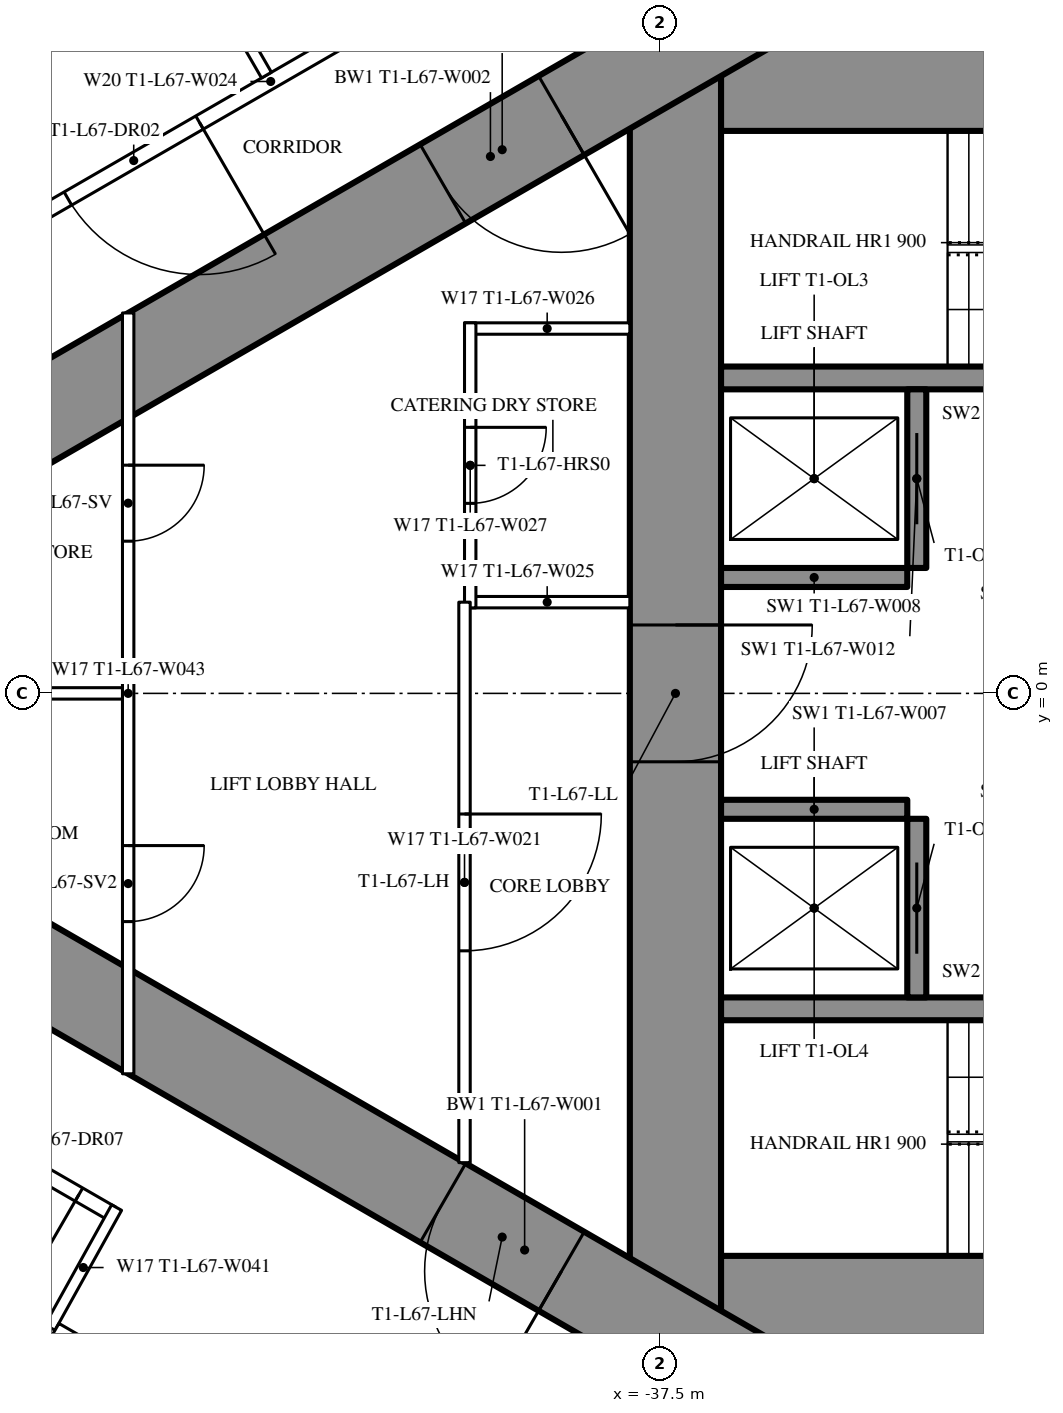
"""IFC4 building model, lengths in metres.
Left out: names, types, materials, properties, quantities, classifications, styles, units other than length and angle.
Written with IfcOpenShell. Run it as: python <this file> out.ifc"""

import sys

from ifc_helpers import new_model, si_unit, direction, frame, frame_2d, origin, place, context, subcontext, project, spatial, rectangle, extrude, element, fill, save


model = new_model("IFC4")
c1 = context("Model", 3, precision=1e-05, world=origin(), true_north=direction((0.0, 1.0)))
c2 = subcontext(c1, "Body", "Model", "MODEL_VIEW")
j1 = project(units=[si_unit("LENGTHUNIT", "METRE"), si_unit("PLANEANGLEUNIT", "RADIAN")], contexts=[c1])
p1 = place(None, origin())
s1 = spatial("IfcSite", under=j1, at=p1, CompositionType="ELEMENT")
p2 = place(p1, origin())
s2 = spatial("IfcBuilding", under=s1, at=p2, CompositionType="ELEMENT")
p3 = place(p2, frame((0.0, 0.0, 251.9)))
s3 = spatial("IfcBuildingStorey", under=s2, at=p3, CompositionType="ELEMENT", Elevation=251.9)
p4 = place(p3, frame((-37.3, 8.6, 0.0), z_axis=(0.0, 0.0, 1.0), x_axis=(0.0, -1.0, 0.0)))
e1 = element("IfcWall", 1, at=p4, inside=s3, PredefinedType="SHEAR", context=c2, shape_type="SweptSolid", body=[
    extrude(rectangle(XDim=17.2, YDim=1.2, at=frame_2d((8.6, 0.0))), origin(), (0.0, 0.0, 1.0), 5.4),
])
p5 = place(p4, frame((7.7, 0.0, 0.0)))
e2 = element("IfcOpeningElement", 2, at=p5, cuts=e1, PredefinedType="OPENING", context=c2, shape_type="SweptSolid", body=[
    extrude(rectangle(XDim=1.8, YDim=2.2, at=frame_2d((0.9, 1.1))), frame((0.0, 0.61, 0.0), z_axis=(0.0, -1.0, 0.0), x_axis=(1.0, 0.0, 0.0)), (0.0, 0.0, 1.0), 1.22),
])
p6 = place(p3, frame((-28.3, 8.0, 0.0), z_axis=(0.0, 0.0, 1.0), x_axis=(-1.0, 0.0, 0.0)))
e3 = element("IfcWall", 3, at=p6, inside=s3, PredefinedType="SHEAR", context=c2, shape_type="SweptSolid", body=[
    extrude(rectangle(XDim=8.4, YDim=1.2, at=frame_2d((4.2, 0.0))), origin(), (0.0, 0.0, 1.0), 5.4),
])
p7 = place(p6, frame((0.25, 0.0, 0.0)))
e4 = element("IfcOpeningElement", 4, at=p7, cuts=e3, PredefinedType="OPENING", context=c2, shape_type="SweptSolid", body=[
    extrude(rectangle(XDim=1.0, YDim=2.2, at=frame_2d((0.5, 1.1))), frame((0.0, 0.61, 0.0), z_axis=(0.0, -1.0, 0.0), x_axis=(1.0, 0.0, 0.0)), (0.0, 0.0, 1.0), 1.22),
])
p8 = place(p3, frame((-28.3, -8.0, 0.0), z_axis=(0.0, 0.0, 1.0), x_axis=(-1.0, 0.0, 0.0)))
e5 = element("IfcWall", 5, at=p8, inside=s3, PredefinedType="SHEAR", context=c2, shape_type="SweptSolid", body=[
    extrude(rectangle(XDim=8.4, YDim=1.2, at=frame_2d((4.2, 0.0))), origin(), (0.0, 0.0, 1.0), 5.4),
])
p9 = place(p8, frame((0.25, 0.0, 0.0)))
e6 = element("IfcOpeningElement", 6, at=p9, cuts=e5, PredefinedType="OPENING", context=c2, shape_type="SweptSolid", body=[
    extrude(rectangle(XDim=1.0, YDim=2.2, at=frame_2d((0.5, 1.1))), frame((0.0, 0.61, 0.0), z_axis=(0.0, -1.0, 0.0), x_axis=(1.0, 0.0, 0.0)), (0.0, 0.0, 1.0), 1.22),
])
for number, where, z_axis, x_axis in (
    (7, (-28.3, 4.15, 0.0), (0.0, 0.0, 1.0), (-1.0, 0.0, 0.0)),
    (8, (-28.3, -4.15, 0.0), (0.0, 0.0, 1.0), (-1.0, 0.0, 0.0)),
):
    element("IfcWall", number, at=place(p3, frame(where, z_axis=z_axis, x_axis=x_axis)), inside=s3, PredefinedType="SHEAR", context=c2, shape_type="SweptSolid", body=[
        extrude(rectangle(XDim=8.4, YDim=0.3, at=frame_2d((4.2, 0.0))), origin(), (0.0, 0.0, 1.0), 5.4),
    ])
p10 = place(p3, frame((-34.125, 4.0, 0.0), z_axis=(0.0, 0.0, 1.0), x_axis=(0.0, -1.0, 0.0)))
e9 = element("IfcWall", 9, at=p10, inside=s3, PredefinedType="SHEAR", context=c2, shape_type="SweptSolid", body=[
    extrude(rectangle(XDim=2.35, YDim=0.25, at=frame_2d((1.175, 0.0))), origin(), (0.0, 0.0, 1.0), 5.4),
])
p11 = place(p10, frame((0.575, 0.0, 0.0)))
e10 = element("IfcOpeningElement", 10, at=p11, cuts=e9, PredefinedType="OPENING", context=c2, shape_type="SweptSolid", body=[
    extrude(rectangle(XDim=1.2, YDim=2.2, at=frame_2d((0.6, 1.1))), frame((0.0, 0.135, 0.0), z_axis=(0.0, -1.0, 0.0), x_axis=(1.0, 0.0, 0.0)), (0.0, 0.0, 1.0), 0.27),
])
p12 = place(p3, frame((-34.25, 1.525, 0.0), z_axis=(0.0, 0.0, 1.0), x_axis=(-1.0, 0.0, 0.0)))
e11 = element("IfcWall", 11, at=p12, inside=s3, PredefinedType="SHEAR", context=c2, shape_type="SweptSolid", body=[
    extrude(rectangle(XDim=2.45, YDim=0.25, at=frame_2d((1.225, 0.0))), origin(), (0.0, 0.0, 1.0), 5.4),
])
p13 = place(p3, frame((-34.125, -1.65, 0.0), z_axis=(0.0, 0.0, 1.0), x_axis=(0.0, -1.0, 0.0)))
e12 = element("IfcWall", 12, at=p13, inside=s3, PredefinedType="SHEAR", context=c2, shape_type="SweptSolid", body=[
    extrude(rectangle(XDim=2.35, YDim=0.25, at=frame_2d((1.175, 0.0))), origin(), (0.0, 0.0, 1.0), 5.4),
])
p14 = place(p13, frame((0.575, 0.0, 0.0)))
e13 = element("IfcOpeningElement", 13, at=p14, cuts=e12, PredefinedType="OPENING", context=c2, shape_type="SweptSolid", body=[
    extrude(rectangle(XDim=1.2, YDim=2.2, at=frame_2d((0.6, 1.1))), frame((0.0, 0.135, 0.0), z_axis=(0.0, -1.0, 0.0), x_axis=(1.0, 0.0, 0.0)), (0.0, 0.0, 1.0), 0.27),
])
p15 = place(p3, frame((-34.25, -1.525, 0.0), z_axis=(0.0, 0.0, 1.0), x_axis=(-1.0, 0.0, 0.0)))
e14 = element("IfcWall", 14, at=p15, inside=s3, PredefinedType="SHEAR", context=c2, shape_type="SweptSolid", body=[
    extrude(rectangle(XDim=2.45, YDim=0.25, at=frame_2d((1.225, 0.0))), origin(), (0.0, 0.0, 1.0), 5.4),
])
p16 = place(p3, frame((-27.2, 14.3, 0.0), z_axis=(0.0, 0.0, 1.0), x_axis=(-0.866026593062, -0.499997940104, 0.0)))
e15 = element("IfcWall", 15, at=p16, inside=s3, PredefinedType="SHEAR", context=c2, shape_type="SweptSolid", body=[
    extrude(rectangle(XDim=28.946, YDim=1.2, at=frame_2d((14.473, 0.0))), origin(), (0.0, 0.0, 1.0), 5.4),
])
p17 = place(p16, frame((4.6, 0.0, 0.0)))
e16 = element("IfcOpeningElement", 16, at=p17, cuts=e15, PredefinedType="OPENING", context=c2, shape_type="SweptSolid", body=[
    extrude(rectangle(XDim=1.0, YDim=2.2, at=frame_2d((0.5, 1.1))), frame((0.0, 0.61, 0.0), z_axis=(0.0, -1.0, 0.0), x_axis=(1.0, 0.0, 0.0)), (0.0, 0.0, 1.0), 1.22),
])
p18 = place(p16, frame((13.395, 0.0, 0.0)))
e17 = element("IfcOpeningElement", 17, at=p18, cuts=e15, PredefinedType="OPENING", context=c2, shape_type="SweptSolid", body=[
    extrude(rectangle(XDim=1.8, YDim=2.2, at=frame_2d((0.9, 1.1))), frame((0.0, 0.61, 0.0), z_axis=(0.0, -1.0, 0.0), x_axis=(1.0, 0.0, 0.0)), (0.0, 0.0, 1.0), 1.22),
])
p19 = place(p3, frame((-27.2, -14.3, 0.0), z_axis=(0.0, 0.0, 1.0), x_axis=(-0.866024021859, 0.500002393557, 0.0)))
e18 = element("IfcWall", 18, at=p19, inside=s3, PredefinedType="SHEAR", context=c2, shape_type="SweptSolid", body=[
    extrude(rectangle(XDim=27.907, YDim=1.2, at=frame_2d((13.954, 0.0))), origin(), (0.0, 0.0, 1.0), 5.4),
])
p20 = place(p19, frame((4.6, 0.0, 0.0)))
e19 = element("IfcOpeningElement", 19, at=p20, cuts=e18, PredefinedType="OPENING", context=c2, shape_type="SweptSolid", body=[
    extrude(rectangle(XDim=1.0, YDim=2.2, at=frame_2d((0.5, 1.1))), frame((0.0, 0.61, 0.0), z_axis=(0.0, -1.0, 0.0), x_axis=(1.0, 0.0, 0.0)), (0.0, 0.0, 1.0), 1.22),
])
p21 = place(p19, frame((13.395, 0.0, 0.0)))
e20 = element("IfcOpeningElement", 20, at=p21, cuts=e18, PredefinedType="OPENING", context=c2, shape_type="SweptSolid", body=[
    extrude(rectangle(XDim=1.8, YDim=2.2, at=frame_2d((0.9, 1.1))), frame((0.0, 0.61, 0.0), z_axis=(0.0, -1.0, 0.0), x_axis=(1.0, 0.0, 0.0)), (0.0, 0.0, 1.0), 1.22),
])
p22 = place(p3, frame((-28.681, 16.101, 0.0), z_axis=(0.0, 0.0, 1.0), x_axis=(-0.866024860443, -0.500000941094, 0.0)))
e21 = element("IfcWall", 21, at=p22, inside=s3, PredefinedType="PARTITIONING", context=c2, shape_type="SweptSolid", body=[
    extrude(rectangle(XDim=32.201, YDim=0.2, at=frame_2d((16.101, 0.0))), origin(), (0.0, 0.0, 1.0), 5.15),
])
p23 = place(p22, frame((7.266, 0.0, 0.0)))
e22 = element("IfcOpeningElement", 22, at=p23, cuts=e21, PredefinedType="OPENING", context=c2, shape_type="SweptSolid", body=[
    extrude(rectangle(XDim=1.8, YDim=2.2, at=frame_2d((0.9, 1.1))), frame((0.0, 0.11, 0.0), z_axis=(0.0, -1.0, 0.0), x_axis=(1.0, 0.0, 0.0)), (0.0, 0.0, 1.0), 0.22),
])
p24 = place(p22, frame((17.182, 0.0, 0.0)))
e23 = element("IfcOpeningElement", 23, at=p24, cuts=e21, PredefinedType="OPENING", context=c2, shape_type="SweptSolid", body=[
    extrude(rectangle(XDim=2.0, YDim=2.4, at=frame_2d((1.0, 1.2))), frame((0.0, 0.11, 0.0), z_axis=(0.0, -1.0, 0.0), x_axis=(1.0, 0.0, 0.0)), (0.0, 0.0, 1.0), 0.22),
])
p25 = place(p22, frame((21.43, 0.0, 0.0)))
e24 = element("IfcOpeningElement", 24, at=p25, cuts=e21, PredefinedType="OPENING", context=c2, shape_type="SweptSolid", body=[
    extrude(rectangle(XDim=1.8, YDim=2.2, at=frame_2d((0.9, 1.1))), frame((0.0, 0.11, 0.0), z_axis=(0.0, -1.0, 0.0), x_axis=(1.0, 0.0, 0.0)), (0.0, 0.0, 1.0), 0.22),
])
p26 = place(p22, frame((27.29, 0.0, 0.0)))
e25 = element("IfcOpeningElement", 25, at=p26, cuts=e21, PredefinedType="OPENING", context=c2, shape_type="SweptSolid", body=[
    extrude(rectangle(XDim=1.8, YDim=2.2, at=frame_2d((0.9, 1.1))), frame((0.0, 0.11, 0.0), z_axis=(0.0, -1.0, 0.0), x_axis=(1.0, 0.0, 0.0)), (0.0, 0.0, 1.0), 0.22),
])
p27 = place(p3, frame((-42.68, 8.134, 0.0), z_axis=(0.0, 0.0, 1.0), x_axis=(-0.499984479505, 0.866034364361, 0.0)))
e26 = element("IfcWall", 26, at=p27, inside=s3, PredefinedType="PARTITIONING", context=c2, shape_type="SweptSolid", body=[
    extrude(rectangle(XDim=5.995, YDim=0.15, at=frame_2d((2.998, 0.0))), origin(), (0.0, 0.0, 1.0), 4.25),
])
p28 = place(p3, frame((-44.715, -6.844, 0.0), z_axis=(0.0, 0.0, 1.0), x_axis=(-0.866025261224, 0.500000246922, 0.0)))
e27 = element("IfcWall", 27, at=p28, inside=s3, PredefinedType="PARTITIONING", context=c2, shape_type="SweptSolid", body=[
    extrude(rectangle(XDim=13.567, YDim=0.2, at=frame_2d((6.783, 0.0))), origin(), (0.0, 0.0, 1.0), 5.15),
])
p29 = place(p28, frame((8.616, 0.0, 0.0)))
e28 = element("IfcOpeningElement", 28, at=p29, cuts=e27, PredefinedType="OPENING", context=c2, shape_type="SweptSolid", body=[
    extrude(rectangle(XDim=2.0, YDim=2.4, at=frame_2d((1.0, 1.2))), frame((0.0, 0.11, 0.0), z_axis=(0.0, -1.0, 0.0), x_axis=(1.0, 0.0, 0.0)), (0.0, 0.0, 1.0), 0.22),
])
p30 = place(p28, frame((2.816, 0.0, 0.0)))
e29 = element("IfcOpeningElement", 29, at=p30, cuts=e27, PredefinedType="OPENING", context=c2, shape_type="SweptSolid", body=[
    extrude(rectangle(XDim=2.0, YDim=2.4, at=frame_2d((1.0, 1.2))), frame((0.0, 0.11, 0.0), z_axis=(0.0, -1.0, 0.0), x_axis=(1.0, 0.0, 0.0)), (0.0, 0.0, 1.0), 0.22),
])
p31 = place(p28, frame((0.5, 0.0, 0.0)))
e30 = element("IfcOpeningElement", 30, at=p31, cuts=e27, PredefinedType="OPENING", context=c2, shape_type="SweptSolid", body=[
    extrude(rectangle(XDim=0.967, YDim=2.2, at=frame_2d((0.483, 1.1))), frame((0.0, 0.11, 0.0), z_axis=(0.0, -1.0, 0.0), x_axis=(1.0, 0.0, 0.0)), (0.0, 0.0, 1.0), 0.22),
])
p32 = place(p3, frame((-44.652, -6.764, 0.0), z_axis=(0.0, 0.0, 1.0), x_axis=(-0.485528096672, -0.8742210632, 0.0)))
e31 = element("IfcWall", 31, at=p32, inside=s3, PredefinedType="PARTITIONING", context=c2, shape_type="SweptSolid", body=[
    extrude(rectangle(XDim=1.805, YDim=0.15, at=frame_2d((0.903, 0.0))), origin(), (0.0, 0.0, 1.0), 5.15),
])
for number, where, z_axis, x_axis in (
    (32, (-37.9, 1.2, 0.0), (0.0, 0.0, 1.0), (-1.0, 0.0, 0.0)),
    (33, (-37.9, 4.8, 0.0), (0.0, 0.0, 1.0), (-1.0, 0.0, 0.0)),
):
    element("IfcWall", number, at=place(p3, frame(where, z_axis=z_axis, x_axis=x_axis)), inside=s3, PredefinedType="PARTITIONING", context=c2, shape_type="SweptSolid", body=[
        extrude(rectangle(XDim=2.175, YDim=0.15, at=frame_2d((1.087, 0.0))), origin(), (0.0, 0.0, 1.0), 5.15),
    ])
p33 = place(p3, frame((-40.0, 4.875, 0.0), z_axis=(0.0, 0.0, 1.0), x_axis=(0.0, -1.0, 0.0)))
e34 = element("IfcWall", 34, at=p33, inside=s3, PredefinedType="PARTITIONING", context=c2, shape_type="SweptSolid", body=[
    extrude(rectangle(XDim=3.75, YDim=0.15, at=frame_2d((1.875, 0.0))), origin(), (0.0, 0.0, 1.0), 5.15),
])
p34 = place(p33, frame((1.375, 0.0, 0.0)))
e35 = element("IfcOpeningElement", 35, at=p34, cuts=e34, PredefinedType="OPENING", context=c2, shape_type="SweptSolid", body=[
    extrude(rectangle(XDim=1.0, YDim=2.2, at=frame_2d((0.5, 1.1))), frame((0.0, 0.085, 0.0), z_axis=(0.0, -1.0, 0.0), x_axis=(1.0, 0.0, 0.0)), (0.0, 0.0, 1.0), 0.17),
])
p35 = place(p3, frame((-40.075, 1.2, 0.0), z_axis=(0.0, 0.0, 1.0), x_axis=(0.0, -1.0, 0.0)))
e36 = element("IfcWall", 36, at=p35, inside=s3, PredefinedType="PARTITIONING", context=c2, shape_type="SweptSolid", body=[
    extrude(rectangle(XDim=7.374, YDim=0.15, at=frame_2d((3.687, 0.0))), origin(), (0.0, 0.0, 1.0), 5.15),
])
p36 = place(p35, frame((2.787, 0.0, 0.0)))
e37 = element("IfcOpeningElement", 37, at=p36, cuts=e36, PredefinedType="OPENING", context=c2, shape_type="SweptSolid", body=[
    extrude(rectangle(XDim=1.8, YDim=2.2, at=frame_2d((0.9, 1.1))), frame((0.0, 0.085, 0.0), z_axis=(0.0, -1.0, 0.0), x_axis=(1.0, 0.0, 0.0)), (0.0, 0.0, 1.0), 0.17),
])
p37 = place(p3, frame((-44.5, 5.005, 0.0), z_axis=(0.0, 0.0, 1.0), x_axis=(0.0, -1.0, 0.0)))
e38 = element("IfcWall", 38, at=p37, inside=s3, PredefinedType="PARTITIONING", context=c2, shape_type="SweptSolid", body=[
    extrude(rectangle(XDim=10.009, YDim=0.15, at=frame_2d((5.005, 0.0))), origin(), (0.0, 0.0, 1.0), 4.3),
])
p38 = place(p37, frame((2.002, 0.0, 0.0)))
e39 = element("IfcOpeningElement", 39, at=p38, cuts=e38, PredefinedType="OPENING", context=c2, shape_type="SweptSolid", body=[
    extrude(rectangle(XDim=1.0, YDim=2.2, at=frame_2d((0.5, 1.1))), frame((0.0, 0.085, 0.0), z_axis=(0.0, -1.0, 0.0), x_axis=(1.0, 0.0, 0.0)), (0.0, 0.0, 1.0), 0.17),
])
p39 = place(p37, frame((7.007, 0.0, 0.0)))
e40 = element("IfcOpeningElement", 40, at=p39, cuts=e38, PredefinedType="OPENING", context=c2, shape_type="SweptSolid", body=[
    extrude(rectangle(XDim=1.0, YDim=2.2, at=frame_2d((0.5, 1.1))), frame((0.0, 0.085, 0.0), z_axis=(0.0, -1.0, 0.0), x_axis=(1.0, 0.0, 0.0)), (0.0, 0.0, 1.0), 0.17),
])
p40 = place(p3, frame((-44.575, 0.0, 0.0), z_axis=(0.0, 0.0, 1.0), x_axis=(-1.0, 0.0, 0.0)))
e41 = element("IfcWall", 41, at=p40, inside=s3, PredefinedType="PARTITIONING", context=c2, shape_type="SweptSolid", body=[
    extrude(rectangle(XDim=8.593, YDim=0.15, at=frame_2d((4.297, 0.0))), origin(), (0.0, 0.0, 1.0), 4.25),
])
p41 = place(p3, frame((-39.758, -11.697, 0.0), z_axis=(0.0, 0.0, 1.0), x_axis=(-0.866024194504, 0.500002094529, 0.0)))
e42 = element("IfcWall", 42, at=p41, inside=s3, PredefinedType="PARTITIONING", context=c2, shape_type="SweptSolid", body=[
    extrude(rectangle(XDim=6.6, YDim=0.25, at=frame_2d((3.3, 0.0))), origin(), (0.0, 0.0, 1.0), 5.15),
])
p42 = place(p24, origin())
e43 = element("IfcDoor", 43, at=p42, inside=s3, OperationType="DOUBLE_DOOR_SINGLE_SWING", PredefinedType="DOOR", context=c2, shape_type="SweptSolid", body=[
    extrude(rectangle(XDim=2.0, YDim=2.4, at=frame_2d((1.0, 1.2))), frame((0.0, 0.025, 0.0), z_axis=(0.0, -1.0, 0.0), x_axis=(1.0, 0.0, 0.0)), (0.0, 0.0, 1.0), 0.05),
])
fill(e23, e43)
p43 = place(p31, origin())
e44 = element("IfcDoor", 44, at=p43, inside=s3, OperationType="SINGLE_SWING_LEFT", PredefinedType="DOOR", context=c2, shape_type="SweptSolid", body=[
    extrude(rectangle(XDim=0.967, YDim=2.2, at=frame_2d((0.483, 1.1))), frame((0.0, 0.025, 0.0), z_axis=(0.0, -1.0, 0.0), x_axis=(1.0, 0.0, 0.0)), (0.0, 0.0, 1.0), 0.05),
])
fill(e30, e44)
p44 = place(p34, origin())
e45 = element("IfcDoor", 45, at=p44, inside=s3, OperationType="SINGLE_SWING_LEFT", PredefinedType="DOOR", context=c2, shape_type="SweptSolid", body=[
    extrude(rectangle(XDim=1.0, YDim=2.2, at=frame_2d((0.5, 1.1))), frame((0.0, 0.025, 0.0), z_axis=(0.0, -1.0, 0.0), x_axis=(1.0, 0.0, 0.0)), (0.0, 0.0, 1.0), 0.05),
])
fill(e35, e45)
p45 = place(p36, origin())
e46 = element("IfcDoor", 46, at=p45, inside=s3, OperationType="DOUBLE_DOOR_SINGLE_SWING", PredefinedType="DOOR", context=c2, shape_type="SweptSolid", body=[
    extrude(rectangle(XDim=1.8, YDim=2.2, at=frame_2d((0.9, 1.1))), frame((0.0, 0.025, 0.0), z_axis=(0.0, -1.0, 0.0), x_axis=(1.0, 0.0, 0.0)), (0.0, 0.0, 1.0), 0.05),
])
fill(e37, e46)
p46 = place(p38, origin())
e47 = element("IfcDoor", 47, at=p46, inside=s3, OperationType="SINGLE_SWING_LEFT", PredefinedType="DOOR", context=c2, shape_type="SweptSolid", body=[
    extrude(rectangle(XDim=1.0, YDim=2.2, at=frame_2d((0.5, 1.1))), frame((0.0, 0.025, 0.0), z_axis=(0.0, -1.0, 0.0), x_axis=(1.0, 0.0, 0.0)), (0.0, 0.0, 1.0), 0.05),
])
fill(e39, e47)
p47 = place(p39, origin())
e48 = element("IfcDoor", 48, at=p47, inside=s3, OperationType="SINGLE_SWING_LEFT", PredefinedType="DOOR", context=c2, shape_type="SweptSolid", body=[
    extrude(rectangle(XDim=1.0, YDim=2.2, at=frame_2d((0.5, 1.1))), frame((0.0, 0.025, 0.0), z_axis=(0.0, -1.0, 0.0), x_axis=(1.0, 0.0, 0.0)), (0.0, 0.0, 1.0), 0.05),
])
fill(e40, e48)
p48 = place(p18, origin())
e49 = element("IfcDoor", 49, at=p48, inside=s3, OperationType="DOUBLE_DOOR_SINGLE_SWING", PredefinedType="DOOR", context=c2, shape_type="SweptSolid", body=[
    extrude(rectangle(XDim=1.8, YDim=2.2, at=frame_2d((0.9, 1.1))), frame((0.0, 0.025, 0.0), z_axis=(0.0, -1.0, 0.0), x_axis=(1.0, 0.0, 0.0)), (0.0, 0.0, 1.0), 0.05),
])
fill(e17, e49)
p49 = place(p21, origin())
e50 = element("IfcDoor", 50, at=p49, inside=s3, OperationType="DOUBLE_DOOR_SINGLE_SWING", PredefinedType="DOOR", context=c2, shape_type="SweptSolid", body=[
    extrude(rectangle(XDim=1.8, YDim=2.2, at=frame_2d((0.9, 1.1))), frame((0.0, 0.025, 0.0), z_axis=(0.0, -1.0, 0.0), x_axis=(1.0, 0.0, 0.0)), (0.0, 0.0, 1.0), 0.05),
])
fill(e20, e50)
p50 = place(p5, origin())
e51 = element("IfcDoor", 51, at=p50, inside=s3, OperationType="DOUBLE_DOOR_SINGLE_SWING", PredefinedType="DOOR", context=c2, shape_type="SweptSolid", body=[
    extrude(rectangle(XDim=1.8, YDim=2.2, at=frame_2d((0.9, 1.1))), frame((0.0, 0.025, 0.0), z_axis=(0.0, -1.0, 0.0), x_axis=(1.0, 0.0, 0.0)), (0.0, 0.0, 1.0), 0.05),
])
fill(e2, e51)
p51 = place(p11, origin())
e52 = element("IfcDoor", 52, at=p51, inside=s3, OperationType="DOUBLE_DOOR_SLIDING", PredefinedType="USERDEFINED", context=c2, shape_type="SweptSolid", body=[
    extrude(rectangle(XDim=1.2, YDim=2.2, at=frame_2d((0.6, 1.1))), frame((0.0, 0.025, 0.0), z_axis=(0.0, -1.0, 0.0), x_axis=(1.0, 0.0, 0.0)), (0.0, 0.0, 1.0), 0.05),
])
fill(e10, e52)
p52 = place(p14, origin())
e53 = element("IfcDoor", 53, at=p52, inside=s3, OperationType="DOUBLE_DOOR_SLIDING", PredefinedType="USERDEFINED", context=c2, shape_type="SweptSolid", body=[
    extrude(rectangle(XDim=1.2, YDim=2.2, at=frame_2d((0.6, 1.1))), frame((0.0, 0.025, 0.0), z_axis=(0.0, -1.0, 0.0), x_axis=(1.0, 0.0, 0.0)), (0.0, 0.0, 1.0), 0.05),
])
fill(e13, e53)
save(model, sys.argv[1])
